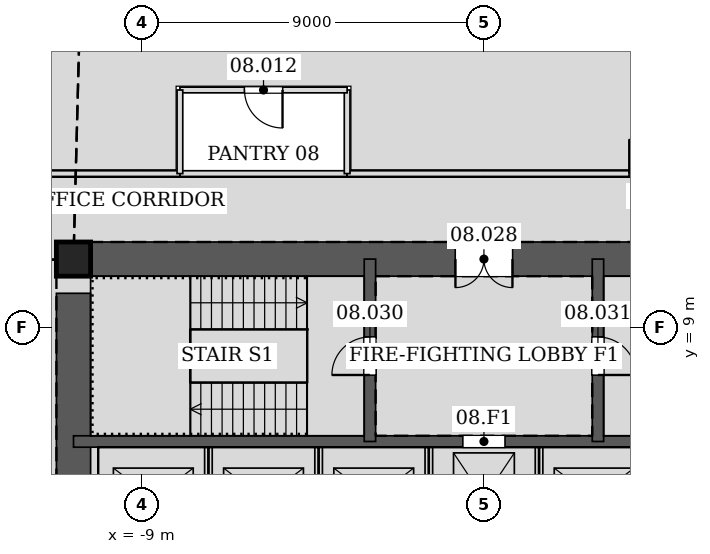
"""IFC4 building model, lengths in metres.
Left out: names, types, materials, properties, quantities, classifications, styles, units other than length and angle.
Written with IfcOpenShell. Run it as: python <this file> out.ifc"""

import sys

from ifc_helpers import new_model, si_unit, direction, frame, frame_2d, origin, origin_2d, place, context, subcontext, project, spatial, rectangle, hollow_rectangle, extrude, element, fill, save


model = new_model("IFC4")
c1 = context("Model", 3, precision=1e-05, world=origin(), true_north=direction((0.0, 1.0)))
c2 = subcontext(c1, "Body", "Model", "MODEL_VIEW")
j1 = project(units=[si_unit("LENGTHUNIT", "METRE"), si_unit("PLANEANGLEUNIT", "RADIAN")], contexts=[c1])
p1 = place(None, origin())
s1 = spatial("IfcSite", under=j1, at=p1, CompositionType="ELEMENT")
p2 = place(p1, origin())
s2 = spatial("IfcBuilding", under=s1, at=p2, CompositionType="ELEMENT")
p3 = place(p2, frame((0.0, 0.0, 41.4)))
s3 = spatial("IfcBuildingStorey", under=s2, at=p3, CompositionType="ELEMENT", Elevation=41.4)
p4 = place(p3, frame((-10.8, 10.8, 0.0), z_axis=(0.0, 0.0, 1.0), x_axis=(1.0, 0.0, 0.0)))
e1 = element("IfcColumn", 1, at=p4, inside=s3, PredefinedType="COLUMN", context=c2, shape_type="SweptSolid", body=[
    extrude(hollow_rectangle(XDim=0.9, YDim=0.9, WallThickness=0.06, at=origin_2d()), origin(), (0.0, 0.0, 1.0), 4.2),
])
p5 = place(p3, frame((10.8, 10.8, 0.0), z_axis=(0.0, 0.0, 1.0), x_axis=(-1.0, 0.0, 0.0)))
e2 = element("IfcWall", 2, at=p5, inside=s3, PredefinedType="SOLIDWALL", context=c2, shape_type="SweptSolid", body=[
    extrude(rectangle(XDim=21.6, YDim=0.9, at=frame_2d((10.8, 0.0))), origin(), (0.0, 0.0, 1.0), 4.2),
])
p6 = place(p5, frame((10.05, 0.0, 0.0)))
e3 = element("IfcOpeningElement", 3, at=p6, cuts=e2, PredefinedType="OPENING", context=c2, shape_type="SweptSolid", body=[
    extrude(rectangle(XDim=1.5, YDim=2.1, at=frame_2d((0.75, 1.05))), frame((0.0, 0.46, 0.0), z_axis=(0.0, -1.0, 0.0), x_axis=(1.0, 0.0, 0.0)), (0.0, 0.0, 1.0), 0.92),
])
p7 = place(p3, frame((-10.8, 10.8, 0.0), z_axis=(0.0, 0.0, 1.0), x_axis=(0.0, -1.0, 0.0)))
e4 = element("IfcWall", 4, at=p7, inside=s3, PredefinedType="SOLIDWALL", context=c2, shape_type="SweptSolid", body=[
    extrude(rectangle(XDim=21.6, YDim=0.9, at=frame_2d((10.8, 0.0))), origin(), (0.0, 0.0, 1.0), 4.2),
])
p8 = place(p7, frame((8.7, 0.0, 0.0)))
e5 = element("IfcOpeningElement", 5, at=p8, cuts=e4, PredefinedType="OPENING", context=c2, shape_type="SweptSolid", body=[
    extrude(rectangle(XDim=1.2, YDim=2.1, at=frame_2d((0.6, 1.05))), frame((0.0, 0.46, 0.0), z_axis=(0.0, -1.0, 0.0), x_axis=(1.0, 0.0, 0.0)), (0.0, 0.0, 1.0), 0.92),
])
p9 = place(p7, frame((11.7, 0.0, 0.0)))
e6 = element("IfcOpeningElement", 6, at=p9, cuts=e4, PredefinedType="OPENING", context=c2, shape_type="SweptSolid", body=[
    extrude(rectangle(XDim=1.2, YDim=2.1, at=frame_2d((0.6, 1.05))), frame((0.0, 0.46, 0.0), z_axis=(0.0, -1.0, 0.0), x_axis=(1.0, 0.0, 0.0)), (0.0, 0.0, 1.0), 0.92),
])
p10 = place(p3, frame((-10.8, 6.0, 0.0), z_axis=(0.0, 0.0, 1.0), x_axis=(1.0, 0.0, 0.0)))
e7 = element("IfcWall", 7, at=p10, inside=s3, PredefinedType="SOLIDWALL", context=c2, shape_type="SweptSolid", body=[
    extrude(rectangle(XDim=21.6, YDim=0.3, at=frame_2d((10.8, 0.0))), origin(), (0.0, 0.0, 1.0), 4.2),
])
p11 = place(p10, frame((10.25, 0.0, 0.0)))
e8 = element("IfcOpeningElement", 8, at=p11, cuts=e7, PredefinedType="OPENING", context=c2, shape_type="SweptSolid", body=[
    extrude(rectangle(XDim=1.1, YDim=2.1, at=frame_2d((0.55, 1.05))), frame((0.0, 0.16, 0.0), z_axis=(0.0, -1.0, 0.0), x_axis=(1.0, 0.0, 0.0)), (0.0, 0.0, 1.0), 0.32),
])
p12 = place(p3, frame((-3.0, 6.0, 0.0), z_axis=(0.0, 0.0, 1.0), x_axis=(0.0, 1.0, 0.0)))
e9 = element("IfcWall", 9, at=p12, inside=s3, PredefinedType="SOLIDWALL", context=c2, shape_type="SweptSolid", body=[
    extrude(rectangle(XDim=4.8, YDim=0.3, at=frame_2d((2.4, 0.0))), origin(), (0.0, 0.0, 1.0), 4.2),
])
p13 = place(p12, frame((1.75, 0.0, 0.0)))
e10 = element("IfcOpeningElement", 10, at=p13, cuts=e9, PredefinedType="OPENING", context=c2, shape_type="SweptSolid", body=[
    extrude(rectangle(XDim=1.0, YDim=2.1, at=frame_2d((0.5, 1.05))), frame((0.0, 0.16, 0.0), z_axis=(0.0, -1.0, 0.0), x_axis=(1.0, 0.0, 0.0)), (0.0, 0.0, 1.0), 0.32),
])
p14 = place(p3, frame((3.0, 6.0, 0.0), z_axis=(0.0, 0.0, 1.0), x_axis=(0.0, 1.0, 0.0)))
e11 = element("IfcWall", 11, at=p14, inside=s3, PredefinedType="SOLIDWALL", context=c2, shape_type="SweptSolid", body=[
    extrude(rectangle(XDim=4.8, YDim=0.3, at=frame_2d((2.4, 0.0))), origin(), (0.0, 0.0, 1.0), 4.2),
])
p15 = place(p14, frame((1.75, 0.0, 0.0)))
e12 = element("IfcOpeningElement", 12, at=p15, cuts=e11, PredefinedType="OPENING", context=c2, shape_type="SweptSolid", body=[
    extrude(rectangle(XDim=1.0, YDim=2.1, at=frame_2d((0.5, 1.05))), frame((0.0, 0.16, 0.0), z_axis=(0.0, -1.0, 0.0), x_axis=(1.0, 0.0, 0.0)), (0.0, 0.0, 1.0), 0.32),
])
p16 = place(p3, frame((-3.599, 13.05, 0.0), z_axis=(0.0, 0.0, 1.0), x_axis=(-1.0, 0.0, 0.0)))
e13 = element("IfcWall", 13, at=p16, inside=s3, PredefinedType="PARTITIONING", context=c2, shape_type="SweptSolid", body=[
    extrude(rectangle(XDim=4.402, YDim=0.15, at=frame_2d((2.201, 0.0))), origin(), (0.0, 0.0, 1.0), 4.035),
])
p17 = place(p3, frame((-7.999, 13.05, 0.0), z_axis=(0.0, 0.0, 1.0), x_axis=(-1.0, 0.0, 0.0)))
e14 = element("IfcWall", 14, at=p17, inside=s3, PredefinedType="PARTITIONING", context=c2, shape_type="SweptSolid", body=[
    extrude(rectangle(XDim=5.051, YDim=0.15, at=frame_2d((2.525, 0.0))), origin(), (0.0, 0.0, 1.0), 3.014),
])
p18 = place(p3, frame((13.05, 13.05, 0.0), z_axis=(0.0, 0.0, 1.0), x_axis=(-1.0, 0.0, 0.0)))
e15 = element("IfcWall", 15, at=p18, inside=s3, PredefinedType="PARTITIONING", context=c2, shape_type="SweptSolid", body=[
    extrude(rectangle(XDim=16.651, YDim=0.15, at=frame_2d((8.326, 0.0))), origin(), (0.0, 0.0, 1.0), 2.984),
])
p19 = place(p18, frame((7.426, 0.0, 0.0)))
e16 = element("IfcOpeningElement", 16, at=p19, cuts=e15, PredefinedType="OPENING", context=c2, shape_type="SweptSolid", body=[
    extrude(rectangle(XDim=1.8, YDim=2.4, at=frame_2d((0.9, 1.2))), frame((0.0, 0.085, 0.0), z_axis=(0.0, -1.0, 0.0), x_axis=(1.0, 0.0, 0.0)), (0.0, 0.0, 1.0), 0.17),
])
p20 = place(p3, frame((-3.6, 13.05, 0.0), z_axis=(0.0, 0.0, 1.0), x_axis=(0.0, 1.0, 0.0)))
e17 = element("IfcWall", 17, at=p20, inside=s3, PredefinedType="PARTITIONING", context=c2, shape_type="SweptSolid", body=[
    extrude(rectangle(XDim=2.2, YDim=0.15, at=frame_2d((1.1, 0.0))), origin(), (0.0, 0.0, 1.0), 3.426),
])
p21 = place(p3, frame((-3.6, 15.25, 0.0), z_axis=(0.0, 0.0, 1.0), x_axis=(-1.0, 0.0, 0.0)))
e18 = element("IfcWall", 18, at=p21, inside=s3, PredefinedType="PARTITIONING", context=c2, shape_type="SweptSolid", body=[
    extrude(rectangle(XDim=4.4, YDim=0.15, at=frame_2d((2.2, 0.0))), origin(), (0.0, 0.0, 1.0), 4.035),
])
p22 = place(p21, frame((1.7, 0.0, 0.0)))
e19 = element("IfcOpeningElement", 19, at=p22, cuts=e18, PredefinedType="OPENING", context=c2, shape_type="SweptSolid", body=[
    extrude(rectangle(XDim=1.0, YDim=2.1, at=frame_2d((0.5, 1.05))), frame((0.0, 0.085, 0.0), z_axis=(0.0, -1.0, 0.0), x_axis=(1.0, 0.0, 0.0)), (0.0, 0.0, 1.0), 0.17),
])
p23 = place(p3, frame((-8.0, 15.25, 0.0), z_axis=(0.0, 0.0, 1.0), x_axis=(0.0, -1.0, 0.0)))
e20 = element("IfcWall", 20, at=p23, inside=s3, PredefinedType="PARTITIONING", context=c2, shape_type="SweptSolid", body=[
    extrude(rectangle(XDim=2.2, YDim=0.15, at=frame_2d((1.1, 0.0))), origin(), (0.0, 0.0, 1.0), 3.426),
])
for number, where, z_axis, x_axis in (
    (21, (-7.25, 3.15, 0.0), (0.0, 0.0, 1.0), (0.0, 1.0, 0.0)),
    (22, (-4.35, 3.15, 0.0), (0.0, 0.0, 1.0), (0.0, 1.0, 0.0)),
    (23, (-1.45, 3.15, 0.0), (0.0, 0.0, 1.0), (0.0, 1.0, 0.0)),
    (24, (1.45, 3.15, 0.0), (0.0, 0.0, 1.0), (0.0, 1.0, 0.0)),
):
    element("IfcWall", number, at=place(p3, frame(where, z_axis=z_axis, x_axis=x_axis)), inside=s3, PredefinedType="PARTITIONING", context=c2, shape_type="SweptSolid", body=[
        extrude(rectangle(XDim=2.7, YDim=0.2, at=frame_2d((1.35, 0.0))), origin(), (0.0, 0.0, 1.0), 4.2),
    ])
p24 = place(p22, origin())
e25 = element("IfcDoor", 25, at=p24, inside=s3, OperationType="SINGLE_SWING_LEFT", PredefinedType="DOOR", context=c2, shape_type="SweptSolid", body=[
    extrude(rectangle(XDim=1.0, YDim=2.1, at=frame_2d((0.5, 1.05))), frame((0.0, 0.025, 0.0), z_axis=(0.0, -1.0, 0.0), x_axis=(1.0, 0.0, 0.0)), (0.0, 0.0, 1.0), 0.05),
])
fill(e19, e25)
p25 = place(p19, frame((1.8, 0.0, 0.0), z_axis=(0.0, 0.0, 1.0), x_axis=(-1.0, 0.0, 0.0)))
e26 = element("IfcDoor", 26, at=p25, inside=s3, OperationType="DOUBLE_DOOR_SINGLE_SWING", PredefinedType="DOOR", context=c2, shape_type="SweptSolid", body=[
    extrude(rectangle(XDim=1.8, YDim=2.4, at=frame_2d((0.9, 1.2))), frame((0.0, 0.025, 0.0), z_axis=(0.0, -1.0, 0.0), x_axis=(1.0, 0.0, 0.0)), (0.0, 0.0, 1.0), 0.05),
])
fill(e16, e26)
p26 = place(p6, origin())
e27 = element("IfcDoor", 27, at=p26, inside=s3, OperationType="DOUBLE_DOOR_SINGLE_SWING", PredefinedType="DOOR", context=c2, shape_type="SweptSolid", body=[
    extrude(rectangle(XDim=1.5, YDim=2.1, at=frame_2d((0.75, 1.05))), frame((0.0, 0.025, 0.0), z_axis=(0.0, -1.0, 0.0), x_axis=(1.0, 0.0, 0.0)), (0.0, 0.0, 1.0), 0.05),
])
fill(e3, e27)
p27 = place(p13, origin())
e28 = element("IfcDoor", 28, at=p27, inside=s3, OperationType="SINGLE_SWING_LEFT", PredefinedType="DOOR", context=c2, shape_type="SweptSolid", body=[
    extrude(rectangle(XDim=1.0, YDim=2.1, at=frame_2d((0.5, 1.05))), frame((0.0, 0.025, 0.0), z_axis=(0.0, -1.0, 0.0), x_axis=(1.0, 0.0, 0.0)), (0.0, 0.0, 1.0), 0.05),
])
fill(e10, e28)
p28 = place(p15, frame((1.0, 0.0, 0.0), z_axis=(0.0, 0.0, 1.0), x_axis=(-1.0, 0.0, 0.0)))
e29 = element("IfcDoor", 29, at=p28, inside=s3, OperationType="SINGLE_SWING_RIGHT", PredefinedType="DOOR", context=c2, shape_type="SweptSolid", body=[
    extrude(rectangle(XDim=1.0, YDim=2.1, at=frame_2d((0.5, 1.05))), frame((0.0, 0.025, 0.0), z_axis=(0.0, -1.0, 0.0), x_axis=(1.0, 0.0, 0.0)), (0.0, 0.0, 1.0), 0.05),
])
fill(e12, e29)
p29 = place(p11, origin())
e30 = element("IfcDoor", 30, at=p29, inside=s3, OperationType="DOUBLE_DOOR_SLIDING", PredefinedType="DOOR", context=c2, shape_type="SweptSolid", body=[
    extrude(rectangle(XDim=1.1, YDim=2.1, at=frame_2d((0.55, 1.05))), frame((0.0, 0.025, 0.0), z_axis=(0.0, -1.0, 0.0), x_axis=(1.0, 0.0, 0.0)), (0.0, 0.0, 1.0), 0.05),
])
fill(e8, e30)
save(model, sys.argv[1])
